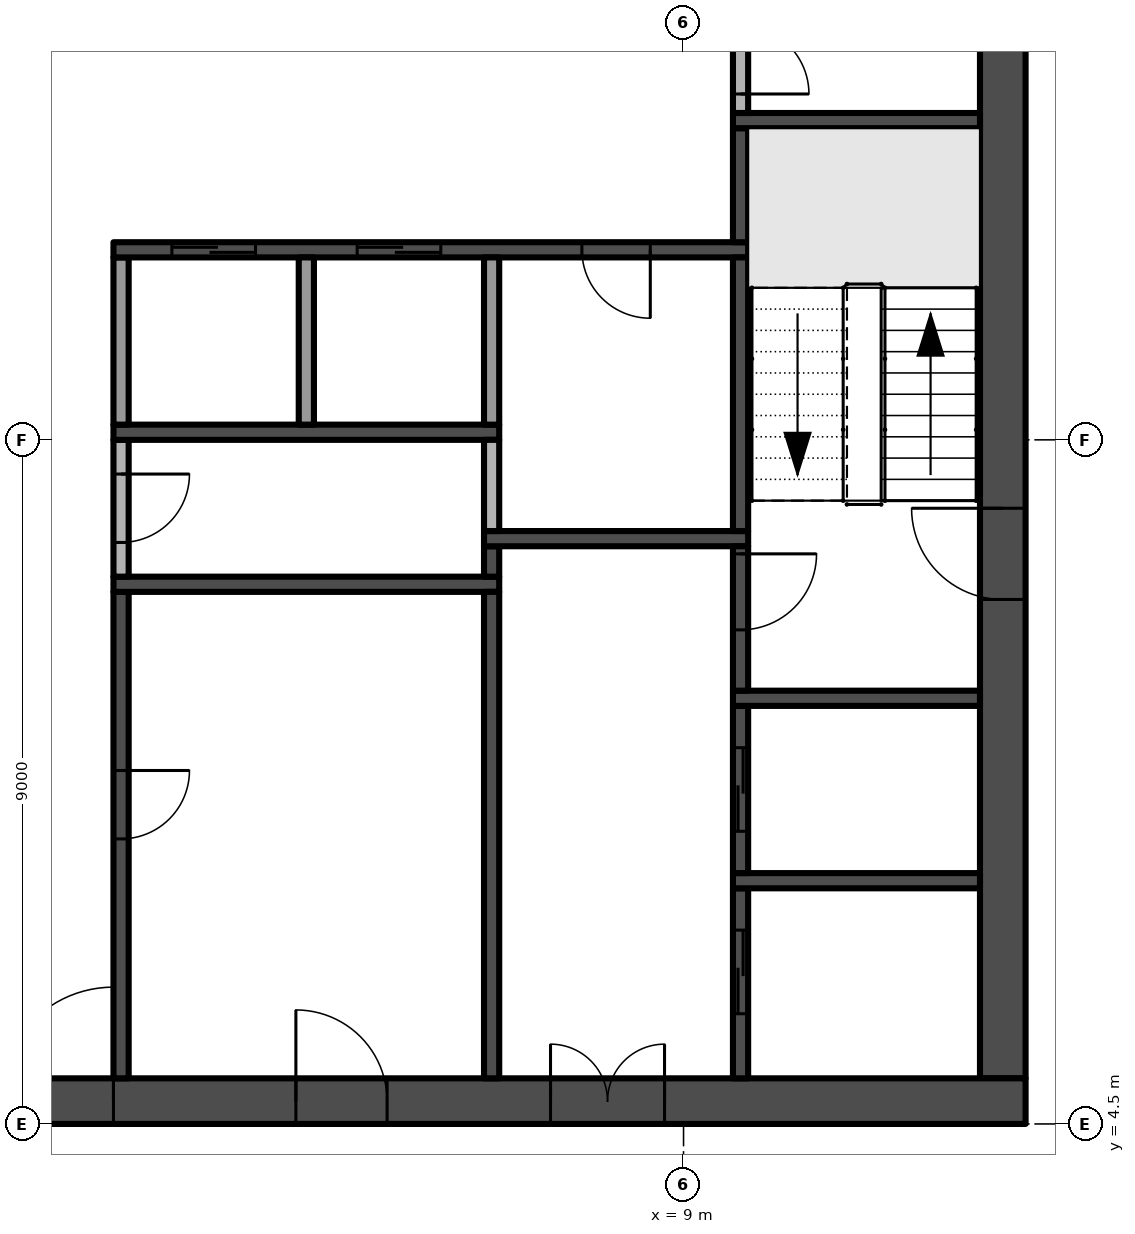
"""IFC4 building model, lengths in metres.
Left out: names, types, materials, properties, quantities, classifications, styles, units other than length and angle.
Written with IfcOpenShell. Run it as: python <this file> out.ifc"""

import sys

from ifc_helpers import new_model, si_unit, direction, frame, frame_2d, origin, place, context, subcontext, project, spatial, rectangle, extrude, element, fill, save


model = new_model("IFC4")
c1 = context("Model", 3, precision=1e-05, world=origin(), true_north=direction((0.0, 1.0)))
c2 = subcontext(c1, "Body", "Model", "MODEL_VIEW")
j1 = project(units=[si_unit("LENGTHUNIT", "METRE"), si_unit("PLANEANGLEUNIT", "RADIAN")], contexts=[c1])
p1 = place(None, origin())
s1 = spatial("IfcSite", under=j1, at=p1, CompositionType="ELEMENT")
p2 = place(p1, origin())
s2 = spatial("IfcBuilding", under=s1, at=p2, CompositionType="ELEMENT")
p3 = place(p2, frame((0.0, 0.0, 257.8)))
s3 = spatial("IfcBuildingStorey", under=s2, at=p3, CompositionType="ELEMENT", Elevation=257.8)
p4 = place(p3, frame((-13.5, 4.8, -0.3), z_axis=(0.0, 0.0, 1.0), x_axis=(1.0, 0.0, 0.0)))
e1 = element("IfcWall", 1, at=p4, inside=s3, PredefinedType="SHEAR", context=c2, shape_type="SweptSolid", body=[
    extrude(rectangle(XDim=27.0, YDim=0.6, at=frame_2d((13.5, 0.0))), origin(), (0.0, 0.0, 1.0), 3.8),
])
p5 = place(p4, frame((12.0, 0.0, 0.3)))
e2 = element("IfcOpeningElement", 2, at=p5, cuts=e1, PredefinedType="OPENING", context=c2, shape_type="SweptSolid", body=[
    extrude(rectangle(XDim=3.0, YDim=2.4, at=frame_2d((1.5, 1.2))), frame((0.0, 0.31, 0.0), z_axis=(0.0, -1.0, 0.0), x_axis=(1.0, 0.0, 0.0)), (0.0, 0.0, 1.0), 0.62),
])
p6 = place(p4, frame((4.9, 0.0, 0.3)))
e3 = element("IfcOpeningElement", 3, at=p6, cuts=e1, PredefinedType="OPENING", context=c2, shape_type="SweptSolid", body=[
    extrude(rectangle(XDim=1.2, YDim=2.2, at=frame_2d((0.6, 1.1))), frame((0.0, 0.31, 0.0), z_axis=(0.0, -1.0, 0.0), x_axis=(1.0, 0.0, 0.0)), (0.0, 0.0, 1.0), 0.62),
])
p7 = place(p4, frame((20.75, 0.0, 0.3)))
e4 = element("IfcOpeningElement", 4, at=p7, cuts=e1, PredefinedType="OPENING", context=c2, shape_type="SweptSolid", body=[
    extrude(rectangle(XDim=1.5, YDim=2.2, at=frame_2d((0.75, 1.1))), frame((0.0, 0.31, 0.0), z_axis=(0.0, -1.0, 0.0), x_axis=(1.0, 0.0, 0.0)), (0.0, 0.0, 1.0), 0.62),
])
p8 = place(p4, frame((17.4, 0.0, 0.3)))
e5 = element("IfcOpeningElement", 5, at=p8, cuts=e1, PredefinedType="OPENING", context=c2, shape_type="SweptSolid", body=[
    extrude(rectangle(XDim=1.2, YDim=2.2, at=frame_2d((0.6, 1.1))), frame((0.0, 0.31, 0.0), z_axis=(0.0, -1.0, 0.0), x_axis=(1.0, 0.0, 0.0)), (0.0, 0.0, 1.0), 0.62),
])
p9 = place(p3, frame((13.2, 5.1, -0.3), z_axis=(0.0, 0.0, 1.0), x_axis=(0.0, 1.0, 0.0)))
e6 = element("IfcWall", 6, at=p9, inside=s3, PredefinedType="SHEAR", context=c2, shape_type="SweptSolid", body=[
    extrude(rectangle(XDim=16.8, YDim=0.6, at=frame_2d((8.4, 0.0))), origin(), (0.0, 0.0, 1.0), 3.8),
])
p10 = place(p9, frame((6.3, 0.0, 0.3)))
e7 = element("IfcOpeningElement", 7, at=p10, cuts=e6, PredefinedType="OPENING", context=c2, shape_type="SweptSolid", body=[
    extrude(rectangle(XDim=1.2, YDim=2.2, at=frame_2d((0.6, 1.1))), frame((0.0, 0.31, 0.0), z_axis=(0.0, -1.0, 0.0), x_axis=(1.0, 0.0, 0.0)), (0.0, 0.0, 1.0), 0.62),
])
p11 = place(p3, frame((1.6, 11.5, 0.0), z_axis=(0.0, 0.0, 1.0), x_axis=(0.0, -1.0, 0.0)))
e8 = element("IfcWall", 8, at=p11, inside=s3, PredefinedType="SHEAR", context=c2, shape_type="SweptSolid", body=[
    extrude(rectangle(XDim=6.4, YDim=0.2, at=frame_2d((3.2, 0.0))), origin(), (0.0, 0.0, 1.0), 3.5),
])
p12 = place(p11, frame((2.35, 0.0, 0.0)))
e9 = element("IfcOpeningElement", 9, at=p12, cuts=e8, PredefinedType="OPENING", context=c2, shape_type="SweptSolid", body=[
    extrude(rectangle(XDim=0.9, YDim=2.1, at=frame_2d((0.45, 1.05))), frame((0.0, 0.11, 0.0), z_axis=(0.0, -1.0, 0.0), x_axis=(1.0, 0.0, 0.0)), (0.0, 0.0, 1.0), 0.22),
])
p13 = place(p3, frame((1.5, 11.6, 0.0), z_axis=(0.0, 0.0, 1.0), x_axis=(1.0, 0.0, 0.0)))
e10 = element("IfcWall", 10, at=p13, inside=s3, PredefinedType="SHEAR", context=c2, shape_type="SweptSolid", body=[
    extrude(rectangle(XDim=5.075, YDim=0.2, at=frame_2d((2.538, 0.0))), origin(), (0.0, 0.0, 1.0), 3.5),
])
p14 = place(p3, frame((1.6, 13.5, 0.0), z_axis=(0.0, 0.0, 1.0), x_axis=(0.0, -1.0, 0.0)))
e11 = element("IfcWall", 11, at=p14, inside=s3, PredefinedType="PARTITIONING", context=c2, shape_type="SweptSolid", body=[
    extrude(rectangle(XDim=1.8, YDim=0.2, at=frame_2d((0.9, 0.0))), origin(), (0.0, 0.0, 1.0), 3.5),
])
p15 = place(p14, frame((0.45, 0.0, 0.0)))
e12 = element("IfcOpeningElement", 12, at=p15, cuts=e11, PredefinedType="OPENING", context=c2, shape_type="SweptSolid", body=[
    extrude(rectangle(XDim=0.9, YDim=2.1, at=frame_2d((0.45, 1.05))), frame((0.0, 0.11, 0.0), z_axis=(0.0, -1.0, 0.0), x_axis=(1.0, 0.0, 0.0)), (0.0, 0.0, 1.0), 0.22),
])
p16 = place(p3, frame((1.5, 13.6, 0.0), z_axis=(0.0, 0.0, 1.0), x_axis=(1.0, 0.0, 0.0)))
e13 = element("IfcWall", 13, at=p16, inside=s3, PredefinedType="SHEAR", context=c2, shape_type="SweptSolid", body=[
    extrude(rectangle(XDim=5.075, YDim=0.2, at=frame_2d((2.538, 0.0))), origin(), (0.0, 0.0, 1.0), 3.5),
])
p17 = place(p3, frame((1.6, 13.7, 0.0), z_axis=(0.0, 0.0, 1.0), x_axis=(0.0, 1.0, 0.0)))
e14 = element("IfcWall", 14, at=p17, inside=s3, PredefinedType="PARTITIONING", context=c2, shape_type="SweptSolid", body=[
    extrude(rectangle(XDim=2.2, YDim=0.2, at=frame_2d((1.1, 0.0))), origin(), (0.0, 0.0, 1.0), 3.5),
])
p18 = place(p3, frame((9.85, 16.0, 0.0), z_axis=(0.0, 0.0, 1.0), x_axis=(-1.0, 0.0, 0.0)))
e15 = element("IfcWall", 15, at=p18, inside=s3, PredefinedType="SHEAR", context=c2, shape_type="SweptSolid", body=[
    extrude(rectangle(XDim=8.35, YDim=0.2, at=frame_2d((4.175, 0.0))), origin(), (0.0, 0.0, 1.0), 3.5),
])
p19 = place(p18, frame((6.481, 0.0, 0.0)))
e16 = element("IfcOpeningElement", 16, at=p19, cuts=e15, PredefinedType="OPENING", context=c2, shape_type="SweptSolid", body=[
    extrude(rectangle(XDim=1.1, YDim=2.1, at=frame_2d((0.55, 1.05))), frame((0.0, 0.11, 0.0), z_axis=(0.0, -1.0, 0.0), x_axis=(1.0, 0.0, 0.0)), (0.0, 0.0, 1.0), 0.22),
])
p20 = place(p18, frame((4.044, 0.0, 0.0)))
e17 = element("IfcOpeningElement", 17, at=p20, cuts=e15, PredefinedType="OPENING", context=c2, shape_type="SweptSolid", body=[
    extrude(rectangle(XDim=1.1, YDim=2.1, at=frame_2d((0.55, 1.05))), frame((0.0, 0.11, 0.0), z_axis=(0.0, -1.0, 0.0), x_axis=(1.0, 0.0, 0.0)), (0.0, 0.0, 1.0), 0.22),
])
p21 = place(p18, frame((1.288, 0.0, 0.0)))
e18 = element("IfcOpeningElement", 18, at=p21, cuts=e15, PredefinedType="OPENING", context=c2, shape_type="SweptSolid", body=[
    extrude(rectangle(XDim=0.9, YDim=2.1, at=frame_2d((0.45, 1.05))), frame((0.0, 0.11, 0.0), z_axis=(0.0, -1.0, 0.0), x_axis=(1.0, 0.0, 0.0)), (0.0, 0.0, 1.0), 0.22),
])
p22 = place(p3, frame((4.037, 13.7, 0.0), z_axis=(0.0, 0.0, 1.0), x_axis=(0.0, 1.0, 0.0)))
e19 = element("IfcWall", 19, at=p22, inside=s3, PredefinedType="PARTITIONING", context=c2, shape_type="SweptSolid", body=[
    extrude(rectangle(XDim=2.2, YDim=0.2, at=frame_2d((1.1, 0.0))), origin(), (0.0, 0.0, 1.0), 3.5),
])
p23 = place(p3, frame((6.475, 5.1, 0.0), z_axis=(0.0, 0.0, 1.0), x_axis=(0.0, 1.0, 0.0)))
e20 = element("IfcWall", 20, at=p23, inside=s3, PredefinedType="SHEAR", context=c2, shape_type="SweptSolid", body=[
    extrude(rectangle(XDim=6.4, YDim=0.2, at=frame_2d((3.2, 0.0))), origin(), (0.0, 0.0, 1.0), 3.5),
])
p24 = place(p3, frame((6.475, 11.7, 0.0), z_axis=(0.0, 0.0, 1.0), x_axis=(0.0, 1.0, 0.0)))
e21 = element("IfcWall", 21, at=p24, inside=s3, PredefinedType="SHEAR", context=c2, shape_type="SweptSolid", body=[
    extrude(rectangle(XDim=0.4, YDim=0.2, at=frame_2d((0.2, 0.0))), origin(), (0.0, 0.0, 1.0), 3.5),
])
p25 = place(p3, frame((6.375, 12.2, 0.0), z_axis=(0.0, 0.0, 1.0), x_axis=(1.0, 0.0, 0.0)))
e22 = element("IfcWall", 22, at=p25, inside=s3, PredefinedType="SHEAR", context=c2, shape_type="SweptSolid", body=[
    extrude(rectangle(XDim=3.475, YDim=0.2, at=frame_2d((1.738, 0.0))), origin(), (0.0, 0.0, 1.0), 3.5),
])
p26 = place(p3, frame((6.475, 12.3, 0.0), z_axis=(0.0, 0.0, 1.0), x_axis=(0.0, 1.0, 0.0)))
e23 = element("IfcWall", 23, at=p26, inside=s3, PredefinedType="PARTITIONING", context=c2, shape_type="SweptSolid", body=[
    extrude(rectangle(XDim=1.2, YDim=0.2, at=frame_2d((0.6, 0.0))), origin(), (0.0, 0.0, 1.0), 3.5),
])
p27 = place(p3, frame((6.475, 13.7, 0.0), z_axis=(0.0, 0.0, 1.0), x_axis=(0.0, 1.0, 0.0)))
e24 = element("IfcWall", 24, at=p27, inside=s3, PredefinedType="PARTITIONING", context=c2, shape_type="SweptSolid", body=[
    extrude(rectangle(XDim=2.2, YDim=0.2, at=frame_2d((1.1, 0.0))), origin(), (0.0, 0.0, 1.0), 3.5),
])
p28 = place(p3, frame((9.75, 5.1, 0.0), z_axis=(0.0, 0.0, 1.0), x_axis=(0.0, 1.0, 0.0)))
e25 = element("IfcWall", 25, at=p28, inside=s3, PredefinedType="SHEAR", context=c2, shape_type="SweptSolid", body=[
    extrude(rectangle(XDim=2.5, YDim=0.2, at=frame_2d((1.25, 0.0))), origin(), (0.0, 0.0, 1.0), 3.5),
])
p29 = place(p28, frame((0.85, 0.0, 0.0)))
e26 = element("IfcOpeningElement", 26, at=p29, cuts=e25, PredefinedType="OPENING", context=c2, shape_type="SweptSolid", body=[
    extrude(rectangle(XDim=1.1, YDim=2.1, at=frame_2d((0.55, 1.05))), frame((0.0, 0.11, 0.0), z_axis=(0.0, -1.0, 0.0), x_axis=(1.0, 0.0, 0.0)), (0.0, 0.0, 1.0), 0.22),
])
p30 = place(p3, frame((9.65, 7.7, 0.0), z_axis=(0.0, 0.0, 1.0), x_axis=(1.0, 0.0, 0.0)))
e27 = element("IfcWall", 27, at=p30, inside=s3, PredefinedType="SHEAR", context=c2, shape_type="SweptSolid", body=[
    extrude(rectangle(XDim=3.25, YDim=0.2, at=frame_2d((1.625, 0.0))), origin(), (0.0, 0.0, 1.0), 3.5),
])
p31 = place(p3, frame((9.75, 7.8, 0.0), z_axis=(0.0, 0.0, 1.0), x_axis=(0.0, 1.0, 0.0)))
e28 = element("IfcWall", 28, at=p31, inside=s3, PredefinedType="SHEAR", context=c2, shape_type="SweptSolid", body=[
    extrude(rectangle(XDim=2.2, YDim=0.2, at=frame_2d((1.1, 0.0))), origin(), (0.0, 0.0, 1.0), 3.5),
])
p32 = place(p31, frame((0.55, 0.0, 0.0)))
e29 = element("IfcOpeningElement", 29, at=p32, cuts=e28, PredefinedType="OPENING", context=c2, shape_type="SweptSolid", body=[
    extrude(rectangle(XDim=1.1, YDim=2.1, at=frame_2d((0.55, 1.05))), frame((0.0, 0.11, 0.0), z_axis=(0.0, -1.0, 0.0), x_axis=(1.0, 0.0, 0.0)), (0.0, 0.0, 1.0), 0.22),
])
p33 = place(p3, frame((9.65, 10.1, 0.0), z_axis=(0.0, 0.0, 1.0), x_axis=(1.0, 0.0, 0.0)))
e30 = element("IfcWall", 30, at=p33, inside=s3, PredefinedType="SHEAR", context=c2, shape_type="SweptSolid", body=[
    extrude(rectangle(XDim=3.25, YDim=0.2, at=frame_2d((1.625, 0.0))), origin(), (0.0, 0.0, 1.0), 3.5),
])
p34 = place(p3, frame((9.75, 12.1, 0.0), z_axis=(0.0, 0.0, 1.0), x_axis=(0.0, -1.0, 0.0)))
e31 = element("IfcWall", 31, at=p34, inside=s3, PredefinedType="SHEAR", context=c2, shape_type="SweptSolid", body=[
    extrude(rectangle(XDim=1.9, YDim=0.2, at=frame_2d((0.95, 0.0))), origin(), (0.0, 0.0, 1.0), 3.5),
])
p35 = place(p34, frame((0.1, 0.0, 0.0)))
e32 = element("IfcOpeningElement", 32, at=p35, cuts=e31, PredefinedType="OPENING", context=c2, shape_type="SweptSolid", body=[
    extrude(rectangle(XDim=1.0, YDim=2.2, at=frame_2d((0.5, 1.1))), frame((0.0, 0.11, 0.0), z_axis=(0.0, -1.0, 0.0), x_axis=(1.0, 0.0, 0.0)), (0.0, 0.0, 1.0), 0.22),
])
p36 = place(p3, frame((9.75, 12.3, 0.0), z_axis=(0.0, 0.0, 1.0), x_axis=(0.0, 1.0, 0.0)))
e33 = element("IfcWall", 33, at=p36, inside=s3, PredefinedType="SHEAR", context=c2, shape_type="SweptSolid", body=[
    extrude(rectangle(XDim=3.6, YDim=0.2, at=frame_2d((1.8, 0.0))), origin(), (0.0, 0.0, 1.0), 3.5),
])
p37 = place(p3, frame((9.75, 16.1, 0.0), z_axis=(0.0, 0.0, 1.0), x_axis=(0.0, 1.0, 0.0)))
e34 = element("IfcWall", 34, at=p37, inside=s3, PredefinedType="SHEAR", context=c2, shape_type="SweptSolid", body=[
    extrude(rectangle(XDim=1.5, YDim=0.2, at=frame_2d((0.75, 0.0))), origin(), (0.0, 0.0, 1.0), 3.5),
])
p38 = place(p3, frame((9.65, 17.7, 0.0), z_axis=(0.0, 0.0, 1.0), x_axis=(1.0, 0.0, 0.0)))
e35 = element("IfcWall", 35, at=p38, inside=s3, PredefinedType="SHEAR", context=c2, shape_type="SweptSolid", body=[
    extrude(rectangle(XDim=3.25, YDim=0.2, at=frame_2d((1.625, 0.0))), origin(), (0.0, 0.0, 1.0), 3.5),
])
p39 = place(p3, frame((9.75, 19.2, 0.0), z_axis=(0.0, 0.0, 1.0), x_axis=(0.0, -1.0, 0.0)))
e36 = element("IfcWall", 36, at=p39, inside=s3, PredefinedType="PARTITIONING", context=c2, shape_type="SweptSolid", body=[
    extrude(rectangle(XDim=1.4, YDim=0.2, at=frame_2d((0.7, 0.0))), origin(), (0.0, 0.0, 1.0), 3.5),
])
p40 = place(p39, frame((0.25, 0.0, 0.0)))
e37 = element("IfcOpeningElement", 37, at=p40, cuts=e36, PredefinedType="OPENING", context=c2, shape_type="SweptSolid", body=[
    extrude(rectangle(XDim=0.9, YDim=2.1, at=frame_2d((0.45, 1.05))), frame((0.0, 0.11, 0.0), z_axis=(0.0, -1.0, 0.0), x_axis=(1.0, 0.0, 0.0)), (0.0, 0.0, 1.0), 0.22),
])
p41 = place(p5, frame((3.0, 0.0, 0.0), z_axis=(0.0, 0.0, 1.0), x_axis=(-1.0, 0.0, 0.0)))
e38 = element("IfcDoor", 38, at=p41, inside=s3, OperationType="DOUBLE_DOOR_SINGLE_SWING", PredefinedType="DOOR", context=c2, shape_type="SweptSolid", body=[
    extrude(rectangle(XDim=3.0, YDim=2.4, at=frame_2d((1.5, 1.2))), frame((0.0, 0.025, 0.0), z_axis=(0.0, -1.0, 0.0), x_axis=(1.0, 0.0, 0.0)), (0.0, 0.0, 1.0), 0.05),
])
fill(e2, e38)
p42 = place(p10, frame((1.2, 0.0, 0.0), z_axis=(0.0, 0.0, 1.0), x_axis=(-1.0, 0.0, 0.0)))
e39 = element("IfcDoor", 39, at=p42, inside=s3, OperationType="SINGLE_SWING_LEFT", PredefinedType="DOOR", context=c2, shape_type="SweptSolid", body=[
    extrude(rectangle(XDim=1.2, YDim=2.2, at=frame_2d((0.6, 1.1))), frame((0.0, 0.025, 0.0), z_axis=(0.0, -1.0, 0.0), x_axis=(1.0, 0.0, 0.0)), (0.0, 0.0, 1.0), 0.05),
])
fill(e7, e39)
p43 = place(p7, frame((1.5, 0.0, 0.0), z_axis=(0.0, 0.0, 1.0), x_axis=(-1.0, 0.0, 0.0)))
e40 = element("IfcDoor", 40, at=p43, inside=s3, OperationType="DOUBLE_DOOR_SINGLE_SWING", PredefinedType="DOOR", context=c2, shape_type="SweptSolid", body=[
    extrude(rectangle(XDim=1.5, YDim=2.2, at=frame_2d((0.75, 1.1))), frame((0.0, 0.025, 0.0), z_axis=(0.0, -1.0, 0.0), x_axis=(1.0, 0.0, 0.0)), (0.0, 0.0, 1.0), 0.05),
])
fill(e4, e40)
p44 = place(p8, frame((1.2, 0.0, 0.0), z_axis=(0.0, 0.0, 1.0), x_axis=(-1.0, 0.0, 0.0)))
e41 = element("IfcDoor", 41, at=p44, inside=s3, OperationType="SINGLE_SWING_RIGHT", PredefinedType="DOOR", context=c2, shape_type="SweptSolid", body=[
    extrude(rectangle(XDim=1.2, YDim=2.2, at=frame_2d((0.6, 1.1))), frame((0.0, 0.025, 0.0), z_axis=(0.0, -1.0, 0.0), x_axis=(1.0, 0.0, 0.0)), (0.0, 0.0, 1.0), 0.05),
])
fill(e5, e41)
p45 = place(p35, origin())
e42 = element("IfcDoor", 42, at=p45, inside=s3, OperationType="SINGLE_SWING_LEFT", PredefinedType="DOOR", context=c2, shape_type="SweptSolid", body=[
    extrude(rectangle(XDim=1.0, YDim=2.2, at=frame_2d((0.5, 1.1))), frame((0.0, 0.025, 0.0), z_axis=(0.0, -1.0, 0.0), x_axis=(1.0, 0.0, 0.0)), (0.0, 0.0, 1.0), 0.05),
])
fill(e32, e42)
p46 = place(p19, origin())
e43 = element("IfcDoor", 43, at=p46, inside=s3, OperationType="SLIDING_TO_RIGHT", PredefinedType="DOOR", context=c2, shape_type="SweptSolid", body=[
    extrude(rectangle(XDim=1.1, YDim=2.1, at=frame_2d((0.55, 1.05))), frame((0.0, 0.025, 0.0), z_axis=(0.0, -1.0, 0.0), x_axis=(1.0, 0.0, 0.0)), (0.0, 0.0, 1.0), 0.05),
])
fill(e16, e43)
p47 = place(p20, origin())
e44 = element("IfcDoor", 44, at=p47, inside=s3, OperationType="SLIDING_TO_RIGHT", PredefinedType="DOOR", context=c2, shape_type="SweptSolid", body=[
    extrude(rectangle(XDim=1.1, YDim=2.1, at=frame_2d((0.55, 1.05))), frame((0.0, 0.025, 0.0), z_axis=(0.0, -1.0, 0.0), x_axis=(1.0, 0.0, 0.0)), (0.0, 0.0, 1.0), 0.05),
])
fill(e17, e44)
p48 = place(p29, origin())
e45 = element("IfcDoor", 45, at=p48, inside=s3, OperationType="SLIDING_TO_RIGHT", PredefinedType="DOOR", context=c2, shape_type="SweptSolid", body=[
    extrude(rectangle(XDim=1.1, YDim=2.1, at=frame_2d((0.55, 1.05))), frame((0.0, 0.025, 0.0), z_axis=(0.0, -1.0, 0.0), x_axis=(1.0, 0.0, 0.0)), (0.0, 0.0, 1.0), 0.05),
])
fill(e26, e45)
p49 = place(p32, origin())
e46 = element("IfcDoor", 46, at=p49, inside=s3, OperationType="SLIDING_TO_RIGHT", PredefinedType="DOOR", context=c2, shape_type="SweptSolid", body=[
    extrude(rectangle(XDim=1.1, YDim=2.1, at=frame_2d((0.55, 1.05))), frame((0.0, 0.025, 0.0), z_axis=(0.0, -1.0, 0.0), x_axis=(1.0, 0.0, 0.0)), (0.0, 0.0, 1.0), 0.05),
])
fill(e29, e46)
p50 = place(p12, origin())
e47 = element("IfcDoor", 47, at=p50, inside=s3, OperationType="SINGLE_SWING_LEFT", PredefinedType="DOOR", context=c2, shape_type="SweptSolid", body=[
    extrude(rectangle(XDim=0.9, YDim=2.1, at=frame_2d((0.45, 1.05))), frame((0.0, 0.025, 0.0), z_axis=(0.0, -1.0, 0.0), x_axis=(1.0, 0.0, 0.0)), (0.0, 0.0, 1.0), 0.05),
])
fill(e9, e47)
p51 = place(p15, origin())
e48 = element("IfcDoor", 48, at=p51, inside=s3, OperationType="SINGLE_SWING_LEFT", PredefinedType="DOOR", context=c2, shape_type="SweptSolid", body=[
    extrude(rectangle(XDim=0.9, YDim=2.1, at=frame_2d((0.45, 1.05))), frame((0.0, 0.025, 0.0), z_axis=(0.0, -1.0, 0.0), x_axis=(1.0, 0.0, 0.0)), (0.0, 0.0, 1.0), 0.05),
])
fill(e12, e48)
p52 = place(p21, origin())
e49 = element("IfcDoor", 49, at=p52, inside=s3, OperationType="SINGLE_SWING_LEFT", PredefinedType="DOOR", context=c2, shape_type="SweptSolid", body=[
    extrude(rectangle(XDim=0.9, YDim=2.1, at=frame_2d((0.45, 1.05))), frame((0.0, 0.025, 0.0), z_axis=(0.0, -1.0, 0.0), x_axis=(1.0, 0.0, 0.0)), (0.0, 0.0, 1.0), 0.05),
])
fill(e18, e49)
p53 = place(p40, origin())
e50 = element("IfcDoor", 50, at=p53, inside=s3, OperationType="SINGLE_SWING_RIGHT", PredefinedType="DOOR", context=c2, shape_type="SweptSolid", body=[
    extrude(rectangle(XDim=0.9, YDim=2.1, at=frame_2d((0.45, 1.05))), frame((0.0, 0.025, 0.0), z_axis=(0.0, -1.0, 0.0), x_axis=(1.0, 0.0, 0.0)), (0.0, 0.0, 1.0), 0.05),
])
fill(e37, e50)
save(model, sys.argv[1])
